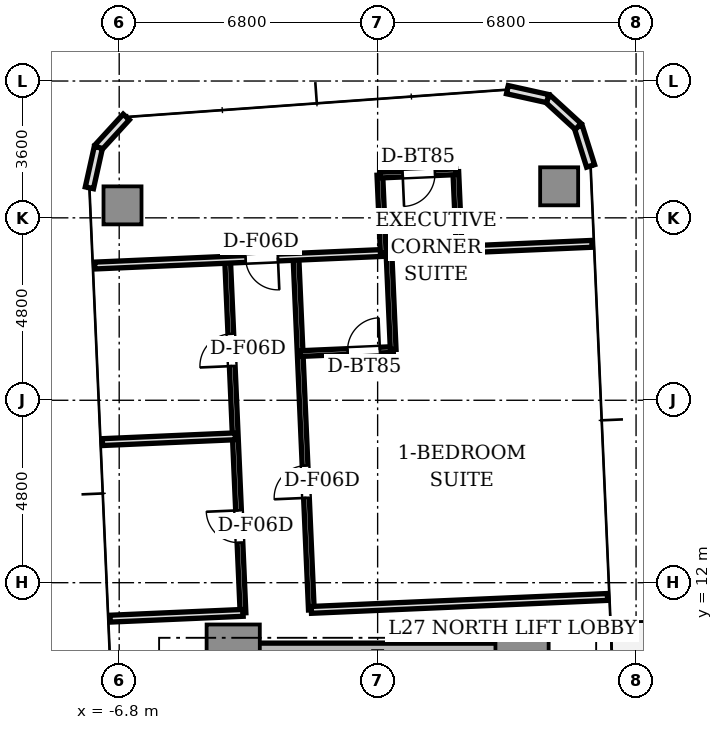
"""IFC4 building model, lengths in metres.
Left out: names, types, materials, properties, quantities, classifications, styles, units other than length and angle.
Written with IfcOpenShell. Run it as: python <this file> out.ifc"""

import sys

from ifc_helpers import new_model, si_unit, direction, frame, frame_2d, origin, origin_2d, place, context, subcontext, project, spatial, rectangle, extrude, source, transform, mapped, element, fill, save


model = new_model("IFC4")
c1 = context("Model", 3, precision=1e-05, world=origin(), true_north=direction((0.0, 1.0)))
c2 = subcontext(c1, "Body", "Model", "MODEL_VIEW")
j1 = project(units=[si_unit("LENGTHUNIT", "METRE"), si_unit("PLANEANGLEUNIT", "RADIAN")], contexts=[c1])
p1 = place(None, origin())
s1 = spatial("IfcSite", under=j1, at=p1, CompositionType="ELEMENT")
p2 = place(p1, origin())
s2 = spatial("IfcBuilding", under=s1, at=p2, CompositionType="ELEMENT")
p3 = place(p2, frame((0.0, 0.0, 100.25)))
s3 = spatial("IfcBuildingStorey", under=s2, at=p3, CompositionType="ELEMENT", Elevation=100.25)
p4 = place(p3, frame((-3.55, 10.2, 0.0), z_axis=(0.0, 0.0, 1.0), x_axis=(1.0, 0.0, 0.0)))
e1 = element("IfcWall", 1, at=p4, inside=s3, PredefinedType="SHEAR", context=c2, shape_type="SweptSolid", body=[
    extrude(rectangle(XDim=7.1, YDim=0.42, at=frame_2d((3.55, 0.0))), origin(), (0.0, 0.0, 1.0), 3.11),
])
m1 = source(origin(), c2, "Body", "SweptSolid", [
    extrude(rectangle(XDim=1.4, YDim=1.4, at=origin_2d()), origin(), (0.0, 0.0, 1.0), 3.11),
])
for number, where, z_axis, x_axis in (
    (2, (-3.8, 10.2, 0.0), (0.0, 0.0, 1.0), (1.0, 0.0, 0.0)),
    (3, (3.8, 10.2, 0.0), (0.0, 0.0, 1.0), (1.0, 0.0, 0.0)),
):
    element("IfcColumn", number, at=place(p3, frame(where, z_axis=z_axis, x_axis=x_axis)), inside=s3, PredefinedType="COLUMN", context=c2, shape_type="MappedRepresentation", body=[
        mapped(m1, transform((0.0, 0.0, 0.0), scale=1.0)),
    ])
m2 = source(origin(), c2, "Body", "SweptSolid", [
    extrude(rectangle(XDim=1.0, YDim=1.0, at=origin_2d()), origin(), (0.0, 0.0, 1.0), 3.11),
])
for number, where, z_axis, x_axis in (
    (4, (4.776, 22.43, 0.0), (0.0, 0.0, 1.0), (1.0, 0.0, 0.0)),
    (5, (-6.713, 21.928, 0.0), (0.0, 0.0, 1.0), (1.0, 0.0, 0.0)),
):
    element("IfcColumn", number, at=place(p3, frame(where, z_axis=z_axis, x_axis=x_axis)), inside=s3, PredefinedType="COLUMN", context=c2, shape_type="MappedRepresentation", body=[
        mapped(m2, transform((0.0, 0.0, 0.0), scale=1.0)),
    ])
p5 = place(p3, frame((5.604, 22.966, 0.0), z_axis=(0.0, 0.0, 1.0), x_axis=(-0.300755105707, 0.953701403161, 0.0)))
e6 = element("IfcWall", 6, at=p5, inside=s3, PredefinedType="STANDARD", context=c2, shape_type="SweptSolid", body=[
    extrude(rectangle(XDim=1.087, YDim=0.22, at=frame_2d((0.543, 0.0))), origin(), (0.0, 0.0, 1.0), 3.11),
])
p6 = place(p3, frame((5.277, 24.003, 0.0), z_axis=(0.0, 0.0, 1.0), x_axis=(-0.737312600672, 0.675551721847, 0.0)))
e7 = element("IfcWall", 7, at=p6, inside=s3, PredefinedType="STANDARD", context=c2, shape_type="SweptSolid", body=[
    extrude(rectangle(XDim=1.087, YDim=0.22, at=frame_2d((0.543, 0.0))), origin(), (0.0, 0.0, 1.0), 3.11),
])
for number, where, z_axis, x_axis in (
    (8, (4.475, 24.737, 0.0), (0.0, 0.0, 1.0), (-0.976, 0.217, 0.0)),
    (9, (-6.614, 24.253, 0.0), (0.0, 0.0, 1.0), (-0.676, -0.737, 0.0)),
):
    element("IfcWall", number, at=place(p3, frame(where, z_axis=z_axis, x_axis=x_axis)), inside=s3, PredefinedType="STANDARD", context=c2, shape_type="SweptSolid", body=[
        extrude(rectangle(XDim=1.087, YDim=0.22, at=frame_2d((0.543, 0.0))), origin(), (0.0, 0.0, 1.0), 3.11),
    ])
p7 = place(p3, frame((-7.349, 23.452, 0.0), z_axis=(0.0, 0.0, 1.0), x_axis=(-0.216454939174, -0.976292609471, 0.0)))
e10 = element("IfcWall", 10, at=p7, inside=s3, PredefinedType="STANDARD", context=c2, shape_type="SweptSolid", body=[
    extrude(rectangle(XDim=1.087, YDim=0.22, at=frame_2d((0.544, 0.0))), origin(), (0.0, 0.0, 1.0), 3.11),
])
p8 = place(p3, frame((-3.542, 11.206, 0.0), z_axis=(0.0, 0.0, 1.0), x_axis=(-0.043604692074, 0.999048863084, 0.0)))
e11 = element("IfcWall", 11, at=p8, inside=s3, PredefinedType="PARTITIONING", context=c2, shape_type="SweptSolid", body=[
    extrude(rectangle(XDim=9.3, YDim=0.15, at=frame_2d((4.65, 0.0))), origin(), (0.0, 0.0, 1.0), 2.66),
])
p9 = place(p8, frame((1.85, 0.0, 0.0)))
e12 = element("IfcOpeningElement", 12, at=p9, cuts=e11, PredefinedType="OPENING", context=c2, shape_type="SweptSolid", body=[
    extrude(rectangle(XDim=0.85, YDim=2.1, at=frame_2d((0.425, 1.05))), frame((0.0, 0.085, 0.0), z_axis=(0.0, -1.0, 0.0), x_axis=(1.0, 0.0, 0.0)), (0.0, 0.0, 1.0), 0.17),
])
p10 = place(p8, frame((6.5, 0.0, 0.0)))
e13 = element("IfcOpeningElement", 13, at=p10, cuts=e11, PredefinedType="OPENING", context=c2, shape_type="SweptSolid", body=[
    extrude(rectangle(XDim=0.85, YDim=2.1, at=frame_2d((0.425, 1.05))), frame((0.0, 0.085, 0.0), z_axis=(0.0, -1.0, 0.0), x_axis=(1.0, 0.0, 0.0)), (0.0, 0.0, 1.0), 0.17),
])
p11 = place(p3, frame((-1.744, 11.285, 0.0), z_axis=(0.0, 0.0, 1.0), x_axis=(-0.043630894187, 0.999047719117, 0.0)))
e14 = element("IfcWall", 14, at=p11, inside=s3, PredefinedType="PARTITIONING", context=c2, shape_type="SweptSolid", body=[
    extrude(rectangle(XDim=9.3, YDim=0.15, at=frame_2d((4.65, 0.0))), origin(), (0.0, 0.0, 1.0), 2.66),
])
p12 = place(p11, frame((2.95, 0.0, 0.0)))
e15 = element("IfcOpeningElement", 15, at=p12, cuts=e14, PredefinedType="OPENING", context=c2, shape_type="SweptSolid", body=[
    extrude(rectangle(XDim=0.85, YDim=2.1, at=frame_2d((0.425, 1.05))), frame((0.0, 0.085, 0.0), z_axis=(0.0, -1.0, 0.0), x_axis=(1.0, 0.0, 0.0)), (0.0, 0.0, 1.0), 0.17),
])
p13 = place(p3, frame((-3.542, 11.206, 0.0), z_axis=(0.0, 0.0, 1.0), x_axis=(-0.999046129111, -0.04366728647, 0.0)))
e16 = element("IfcWall", 16, at=p13, inside=s3, PredefinedType="PARTITIONING", context=c2, shape_type="SweptSolid", body=[
    extrude(rectangle(XDim=3.5, YDim=0.18, at=frame_2d((1.75, 0.0))), origin(), (0.0, 0.0, 1.0), 2.66),
])
p14 = place(p3, frame((6.049, 11.625, 0.0), z_axis=(0.0, 0.0, 1.0), x_axis=(-0.999047634936, -0.043632821702, 0.0)))
e17 = element("IfcWall", 17, at=p14, inside=s3, PredefinedType="PARTITIONING", context=c2, shape_type="SweptSolid", body=[
    extrude(rectangle(XDim=7.8, YDim=0.18, at=frame_2d((3.9, 0.0))), origin(), (0.0, 0.0, 1.0), 2.66),
])
p15 = place(p3, frame((-3.745, 15.852, 0.0), z_axis=(0.0, 0.0, 1.0), x_axis=(-0.999049169846, -0.043597663116, 0.0)))
e18 = element("IfcWall", 18, at=p15, inside=s3, PredefinedType="PARTITIONING", context=c2, shape_type="SweptSolid", body=[
    extrude(rectangle(XDim=3.5, YDim=0.18, at=frame_2d((1.75, 0.0))), origin(), (0.0, 0.0, 1.0), 2.66),
])
p16 = place(p3, frame((-2.038, 18.028, 0.0), z_axis=(0.0, 0.0, 1.0), x_axis=(0.999051263243, 0.043549666039, 0.0)))
e19 = element("IfcWall", 19, at=p16, inside=s3, PredefinedType="PARTITIONING", context=c2, shape_type="SweptSolid", body=[
    extrude(rectangle(XDim=2.45, YDim=0.15, at=frame_2d((1.225, 0.0))), origin(), (0.0, 0.0, 1.0), 2.66),
])
p17 = place(p16, frame((1.25, 0.0, 0.0)))
e20 = element("IfcOpeningElement", 20, at=p17, cuts=e19, PredefinedType="OPENING", context=c2, shape_type="SweptSolid", body=[
    extrude(rectangle(XDim=0.85, YDim=2.1, at=frame_2d((0.425, 1.05))), frame((0.0, 0.085, 0.0), z_axis=(0.0, -1.0, 0.0), x_axis=(1.0, 0.0, 0.0)), (0.0, 0.0, 1.0), 0.17),
])
p18 = place(p3, frame((0.409, 18.135, 0.0), z_axis=(0.0, 0.0, 1.0), x_axis=(-0.043561867058, 0.999050731314, 0.0)))
e21 = element("IfcWall", 21, at=p18, inside=s3, PredefinedType="PARTITIONING", context=c2, shape_type="SweptSolid", body=[
    extrude(rectangle(XDim=2.55, YDim=0.15, at=frame_2d((1.275, 0.0))), origin(), (0.0, 0.0, 1.0), 2.66),
])
p19 = place(p3, frame((5.643, 20.916, 0.0), z_axis=(0.0, 0.0, 1.0), x_axis=(-0.999047841598, -0.043628089563, 0.0)))
e22 = element("IfcWall", 22, at=p19, inside=s3, PredefinedType="PARTITIONING", context=c2, shape_type="SweptSolid", body=[
    extrude(rectangle(XDim=13.1, YDim=0.18, at=frame_2d((6.55, 0.0))), origin(), (0.0, 0.0, 1.0), 2.66),
])
p20 = place(p19, frame((8.275, 0.0, 0.0)))
e23 = element("IfcOpeningElement", 23, at=p20, cuts=e22, PredefinedType="OPENING", context=c2, shape_type="SweptSolid", body=[
    extrude(rectangle(XDim=0.85, YDim=2.1, at=frame_2d((0.425, 1.05))), frame((0.0, 0.1, 0.0), z_axis=(0.0, -1.0, 0.0), x_axis=(1.0, 0.0, 0.0)), (0.0, 0.0, 1.0), 0.2),
])
p21 = place(p3, frame((0.148, 20.676, 0.0), z_axis=(0.0, 0.0, 1.0), x_axis=(-0.043587097972, 0.999049630844, 0.0)))
e24 = element("IfcWall", 24, at=p21, inside=s3, PredefinedType="PARTITIONING", context=c2, shape_type="SweptSolid", body=[
    extrude(rectangle(XDim=2.05, YDim=0.15, at=frame_2d((1.025, 0.0))), origin(), (0.0, 0.0, 1.0), 2.66),
])
p22 = place(p3, frame((2.146, 20.763, 0.0), z_axis=(0.0, 0.0, 1.0), x_axis=(-0.043711161805, 0.9990442104, 0.0)))
e25 = element("IfcWall", 25, at=p22, inside=s3, PredefinedType="PARTITIONING", context=c2, shape_type="SweptSolid", body=[
    extrude(rectangle(XDim=2.05, YDim=0.15, at=frame_2d((1.025, 0.0))), origin(), (0.0, 0.0, 1.0), 2.66),
])
p23 = place(p3, frame((2.057, 22.811, 0.0), z_axis=(0.0, 0.0, 1.0), x_axis=(-0.999049929275, -0.043580257179, 0.0)))
e26 = element("IfcWall", 26, at=p23, inside=s3, PredefinedType="PARTITIONING", context=c2, shape_type="SweptSolid", body=[
    extrude(rectangle(XDim=2.0, YDim=0.15, at=frame_2d((1.0, 0.0))), origin(), (0.0, 0.0, 1.0), 2.66),
])
p24 = place(p23, frame((0.55, 0.0, 0.0)))
e27 = element("IfcOpeningElement", 27, at=p24, cuts=e26, PredefinedType="OPENING", context=c2, shape_type="SweptSolid", body=[
    extrude(rectangle(XDim=0.85, YDim=2.1, at=frame_2d((0.425, 1.05))), frame((0.0, 0.085, 0.0), z_axis=(0.0, -1.0, 0.0), x_axis=(1.0, 0.0, 0.0)), (0.0, 0.0, 1.0), 0.17),
])
m3 = source(origin(), c2, "Body", "SweptSolid", [
    extrude(rectangle(XDim=0.85, YDim=0.05, at=origin_2d()), origin(), (0.0, 0.0, 1.0), 2.1),
])
p25 = place(p9, frame((0.425, 0.0, 0.0)))
e28 = element("IfcDoor", 28, at=p25, inside=s3, OperationType="SINGLE_SWING_RIGHT", PredefinedType="DOOR", context=c2, shape_type="MappedRepresentation", body=[
    mapped(m3, transform((0.0, 0.0, 0.0), scale=1.0)),
])
fill(e12, e28)
p26 = place(p10, frame((0.425, 0.0, 0.0)))
e29 = element("IfcDoor", 29, at=p26, inside=s3, OperationType="SINGLE_SWING_LEFT", PredefinedType="DOOR", context=c2, shape_type="MappedRepresentation", body=[
    mapped(m3, transform((0.0, 0.0, 0.0), scale=1.0)),
])
fill(e13, e29)
p27 = place(p17, frame((0.425, 0.0, 0.0)))
e30 = element("IfcDoor", 30, at=p27, inside=s3, OperationType="SINGLE_SWING_RIGHT", PredefinedType="DOOR", context=c2, shape_type="MappedRepresentation", body=[
    mapped(m3, transform((0.0, 0.0, 0.0), scale=1.0)),
])
fill(e20, e30)
p28 = place(p12, frame((0.425, 0.0, 0.0)))
e31 = element("IfcDoor", 31, at=p28, inside=s3, OperationType="SINGLE_SWING_LEFT", PredefinedType="DOOR", context=c2, shape_type="MappedRepresentation", body=[
    mapped(m3, transform((0.0, 0.0, 0.0), scale=1.0)),
])
fill(e15, e31)
p29 = place(p24, frame((0.425, 0.0, 0.0)))
e32 = element("IfcDoor", 32, at=p29, inside=s3, OperationType="SINGLE_SWING_RIGHT", PredefinedType="DOOR", context=c2, shape_type="MappedRepresentation", body=[
    mapped(m3, transform((0.0, 0.0, 0.0), scale=1.0)),
])
fill(e27, e32)
p30 = place(p20, frame((0.425, 0.0, 0.0)))
e33 = element("IfcDoor", 33, at=p30, inside=s3, OperationType="SINGLE_SWING_LEFT", PredefinedType="DOOR", context=c2, shape_type="MappedRepresentation", body=[
    mapped(m3, transform((0.0, 0.0, 0.0), scale=1.0)),
])
fill(e23, e33)
save(model, sys.argv[1])
